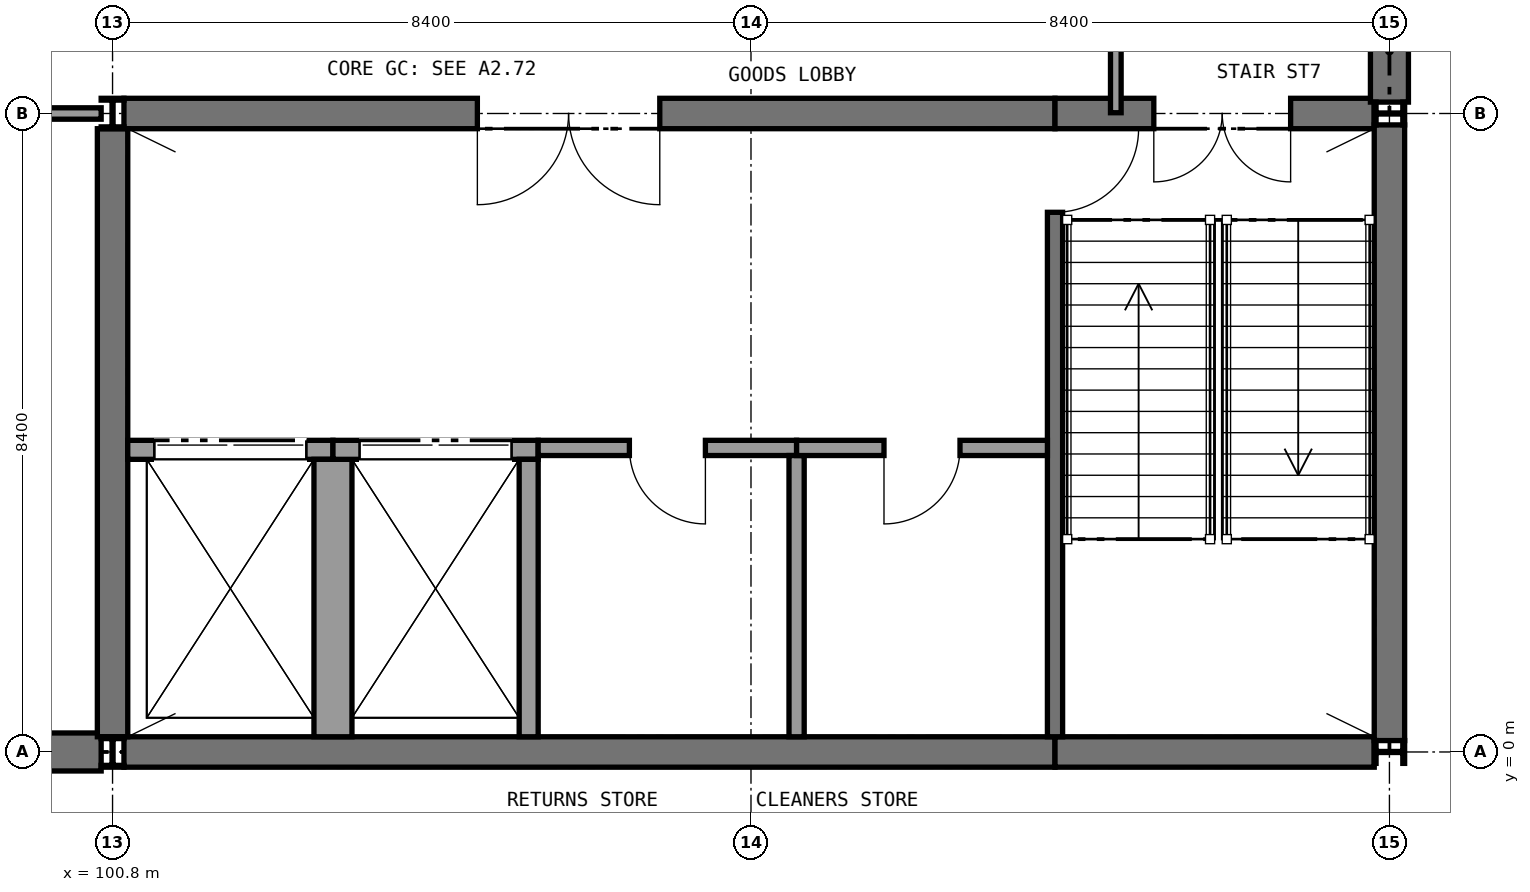
"""IFC4 building model, lengths in metres.
Left out: names, types, materials, properties, quantities, classifications, styles, units other than length and angle.
Written with IfcOpenShell. Run it as: python <this file> out.ifc"""

import sys

from ifc_helpers import new_model, si_unit, direction, frame, frame_2d, origin, origin_2d, place, context, subcontext, project, spatial, rectangle, i_section, extrude, element, fill, save


model = new_model("IFC4")
c1 = context("Model", 3, precision=1e-05, world=origin(), true_north=direction((0.0, 1.0)))
c2 = subcontext(c1, "Body", "Model", "MODEL_VIEW")
j1 = project(units=[si_unit("LENGTHUNIT", "METRE"), si_unit("PLANEANGLEUNIT", "RADIAN")], contexts=[c1])
p1 = place(None, origin())
s1 = spatial("IfcSite", under=j1, at=p1, CompositionType="ELEMENT")
p2 = place(p1, origin())
s2 = spatial("IfcBuilding", under=s1, at=p2, CompositionType="ELEMENT")
p3 = place(p2, frame((0.0, 0.0, 25.8)))
s3 = spatial("IfcBuildingStorey", under=s2, at=p3, CompositionType="ELEMENT", Elevation=25.8)
p4 = place(p3, frame((92.55, 0.0, 0.0), z_axis=(0.0, 0.0, 1.0), x_axis=(1.0, 0.0, 0.0)))
e1 = element("IfcWall", 1, at=p4, inside=s3, PredefinedType="SHEAR", context=c2, shape_type="SweptSolid", body=[
    extrude(rectangle(XDim=8.1, YDim=0.5, at=frame_2d((4.05, 0.0))), origin(), (0.0, 0.0, 1.0), 5.2),
])
p5 = place(p3, frame((100.95, 0.0, 0.0), z_axis=(0.0, 0.0, 1.0), x_axis=(1.0, 0.0, 0.0)))
e2 = element("IfcWall", 2, at=p5, inside=s3, PredefinedType="SHEAR", context=c2, shape_type="SweptSolid", body=[
    extrude(rectangle(XDim=12.25, YDim=0.4, at=frame_2d((6.125, 0.0))), origin(), (0.0, 0.0, 1.0), 5.2),
])
p6 = place(p3, frame((113.2, 0.0, 0.0), z_axis=(0.0, 0.0, 1.0), x_axis=(1.0, 0.0, 0.0)))
e3 = element("IfcWall", 3, at=p6, inside=s3, PredefinedType="SHEAR", context=c2, shape_type="SweptSolid", body=[
    extrude(rectangle(XDim=4.2, YDim=0.4, at=frame_2d((2.1, 0.0))), origin(), (0.0, 0.0, 1.0), 4.51),
])
p7 = place(p3, frame((100.95, 8.4, 0.0), z_axis=(0.0, 0.0, 1.0), x_axis=(1.0, 0.0, 0.0)))
e4 = element("IfcWall", 4, at=p7, inside=s3, PredefinedType="SHEAR", context=c2, shape_type="SweptSolid", body=[
    extrude(rectangle(XDim=12.25, YDim=0.4, at=frame_2d((6.125, 0.0))), origin(), (0.0, 0.0, 1.0), 5.2),
])
p8 = place(p7, frame((4.65, 0.0, 0.0)))
e5 = element("IfcOpeningElement", 5, at=p8, cuts=e4, PredefinedType="OPENING", context=c2, shape_type="SweptSolid", body=[
    extrude(rectangle(XDim=2.4, YDim=2.4, at=frame_2d((1.2, 1.2))), frame((0.0, 0.21, 0.0), z_axis=(0.0, -1.0, 0.0), x_axis=(1.0, 0.0, 0.0)), (0.0, 0.0, 1.0), 0.42),
])
p9 = place(p3, frame((113.2, 8.4, 0.0), z_axis=(0.0, 0.0, 1.0), x_axis=(1.0, 0.0, 0.0)))
e6 = element("IfcWall", 6, at=p9, inside=s3, PredefinedType="SHEAR", context=c2, shape_type="SweptSolid", body=[
    extrude(rectangle(XDim=4.2, YDim=0.4, at=frame_2d((2.1, 0.0))), origin(), (0.0, 0.0, 1.0), 4.51),
])
p10 = place(p9, frame((1.3, 0.0, 0.0)))
e7 = element("IfcOpeningElement", 7, at=p10, cuts=e6, PredefinedType="OPENING", context=c2, shape_type="SweptSolid", body=[
    extrude(rectangle(XDim=1.8, YDim=2.1, at=frame_2d((0.9, 1.05))), frame((0.0, 0.21, 0.0), z_axis=(0.0, -1.0, 0.0), x_axis=(1.0, 0.0, 0.0)), (0.0, 0.0, 1.0), 0.42),
])
p11 = place(p3, frame((100.8, 0.2, 0.0), z_axis=(0.0, 0.0, 1.0), x_axis=(0.0, 1.0, 0.0)))
e8 = element("IfcWall", 8, at=p11, inside=s3, PredefinedType="SHEAR", context=c2, shape_type="SweptSolid", body=[
    extrude(rectangle(XDim=8.0, YDim=0.4, at=frame_2d((4.0, 0.0))), origin(), (0.0, 0.0, 1.0), 5.2),
])
p12 = place(p3, frame((117.6, 0.15, 0.0), z_axis=(0.0, 0.0, 1.0), x_axis=(0.0, 1.0, 0.0)))
e9 = element("IfcWall", 9, at=p12, inside=s3, PredefinedType="SHEAR", context=c2, shape_type="SweptSolid", body=[
    extrude(rectangle(XDim=8.1, YDim=0.4, at=frame_2d((4.05, 0.0))), origin(), (0.0, 0.0, 1.0), 5.2),
])
for number, where, z_axis, x_axis in (
    (10, (100.8, 0.0, 0.0), (0.0, 0.0, 1.0), (1.0, 0.0, 0.0)),
    (11, (100.8, 8.4, 0.0), (0.0, 0.0, 1.0), (1.0, 0.0, 0.0)),
    (12, (117.6, 0.0, 0.0), (0.0, 0.0, 1.0), (0.0, 1.0, 0.0)),
    (13, (117.6, 8.4, 0.0), (0.0, 0.0, 1.0), (0.0, 1.0, 0.0)),
):
    element("IfcColumn", number, at=place(p3, frame(where, z_axis=z_axis, x_axis=x_axis)), inside=s3, PredefinedType="COLUMN", context=c2, shape_type="SweptSolid", body=[
        extrude(i_section(OverallWidth=0.3, OverallDepth=0.4, WebThickness=0.013, FlangeThickness=0.024, FilletRadius=0.027, at=origin_2d()), origin(), (0.0, 0.0, 1.0), 5.4),
    ])
p13 = place(p3, frame((92.55, 8.4, 0.0), z_axis=(0.0, 0.0, 1.0), x_axis=(1.0, 0.0, 0.0)))
e14 = element("IfcWall", 14, at=p13, inside=s3, PredefinedType="SOLIDWALL", context=c2, shape_type="SweptSolid", body=[
    extrude(rectangle(XDim=8.1, YDim=0.15, at=frame_2d((4.05, 0.0))), origin(), (0.0, 0.0, 1.0), 4.89),
])
p14 = place(p13, frame((3.35, 0.0, 0.0)))
e15 = element("IfcOpeningElement", 15, at=p14, cuts=e14, PredefinedType="OPENING", context=c2, shape_type="SweptSolid", body=[
    extrude(rectangle(XDim=1.5, YDim=2.1, at=frame_2d((0.75, 1.05))), frame((0.0, 0.085, 0.0), z_axis=(0.0, -1.0, 0.0), x_axis=(1.0, 0.0, 0.0)), (0.0, 0.0, 1.0), 0.17),
])
p15 = place(p3, frame((114.0, 8.41, 0.0), z_axis=(0.0, 0.0, 1.0), x_axis=(0.0, 1.0, 0.0)))
e16 = element("IfcWall", 16, at=p15, inside=s3, PredefinedType="PARTITIONING", context=c2, shape_type="SweptSolid", body=[
    extrude(rectangle(XDim=7.1, YDim=0.14, at=frame_2d((3.55, 0.0))), origin(), (0.0, 0.0, 1.0), 5.2),
])
p16 = place(p3, frame((117.6, 8.55, 0.0), z_axis=(0.0, 0.0, 1.0), x_axis=(0.0, 1.0, 0.0)))
e17 = element("IfcWall", 17, at=p16, inside=s3, PredefinedType="STANDARD", context=c2, shape_type="SweptSolid", body=[
    extrude(rectangle(XDim=8.1, YDim=0.5, at=frame_2d((4.05, 0.0))), origin(), (0.0, 0.0, 1.0), 5.2),
])
p17 = place(p16, frame((1.35, 0.0, 2.7)))
e18 = element("IfcOpeningElement", 18, at=p17, cuts=e17, PredefinedType="OPENING", context=c2, shape_type="SweptSolid", body=[
    extrude(rectangle(XDim=1.2, YDim=1.2, at=frame_2d((0.6, 0.6))), frame((0.0, 0.26, 0.0), z_axis=(0.0, -1.0, 0.0), x_axis=(1.0, 0.0, 0.0)), (0.0, 0.0, 1.0), 0.52),
])
p18 = place(p16, frame((5.55, 0.0, 2.7)))
e19 = element("IfcOpeningElement", 19, at=p18, cuts=e17, PredefinedType="OPENING", context=c2, shape_type="SweptSolid", body=[
    extrude(rectangle(XDim=1.2, YDim=1.2, at=frame_2d((0.6, 0.6))), frame((0.0, 0.26, 0.0), z_axis=(0.0, -1.0, 0.0), x_axis=(1.0, 0.0, 0.0)), (0.0, 0.0, 1.0), 0.52),
])
p19 = place(p3, frame((113.2, 0.2, 0.0), z_axis=(0.0, 0.0, 1.0), x_axis=(0.0, 1.0, 0.0)))
e20 = element("IfcWall", 20, at=p19, inside=s3, PredefinedType="SHEAR", context=c2, shape_type="SweptSolid", body=[
    extrude(rectangle(XDim=8.0, YDim=0.2, at=frame_2d((4.0, 0.0))), origin(), (0.0, 0.0, 1.0), 5.2),
])
p20 = place(p19, frame((6.9, 0.0, 0.0)))
e21 = element("IfcOpeningElement", 21, at=p20, cuts=e20, PredefinedType="OPENING", context=c2, shape_type="SweptSolid", body=[
    extrude(rectangle(XDim=1.11, YDim=2.1, at=frame_2d((0.555, 1.05))), frame((0.0, 0.11, 0.0), z_axis=(0.0, -1.0, 0.0), x_axis=(1.0, 0.0, 0.0)), (0.0, 0.0, 1.0), 0.22),
])
p21 = place(p3, frame((101.0, 3.975, 0.0), z_axis=(0.0, 0.0, 1.0), x_axis=(1.0, 0.0, 0.0)))
e22 = element("IfcWall", 22, at=p21, inside=s3, PredefinedType="SOLIDWALL", context=c2, shape_type="SweptSolid", body=[
    extrude(rectangle(XDim=2.7, YDim=0.25, at=frame_2d((1.35, 0.0))), origin(), (0.0, 0.0, 1.0), 5.2),
])
p22 = place(p21, frame((0.35, 0.0, 0.0)))
e23 = element("IfcOpeningElement", 23, at=p22, cuts=e22, PredefinedType="OPENING", context=c2, shape_type="SweptSolid", body=[
    extrude(rectangle(XDim=2.0, YDim=2.2, at=frame_2d((1.0, 1.1))), frame((0.0, 0.135, 0.0), z_axis=(0.0, -1.0, 0.0), x_axis=(1.0, 0.0, 0.0)), (0.0, 0.0, 1.0), 0.27),
])
p23 = place(p3, frame((103.7, 0.2, 0.0), z_axis=(0.0, 0.0, 1.0), x_axis=(0.0, 1.0, 0.0)))
e24 = element("IfcWall", 24, at=p23, inside=s3, PredefinedType="SOLIDWALL", context=c2, shape_type="SweptSolid", body=[
    extrude(rectangle(XDim=3.65, YDim=0.5, at=frame_2d((1.825, 0.0))), origin(), (0.0, 0.0, 1.0), 5.2),
])
p24 = place(p3, frame((103.7, 3.975, 0.0), z_axis=(0.0, 0.0, 1.0), x_axis=(1.0, 0.0, 0.0)))
e25 = element("IfcWall", 25, at=p24, inside=s3, PredefinedType="SOLIDWALL", context=c2, shape_type="SweptSolid", body=[
    extrude(rectangle(XDim=2.7, YDim=0.25, at=frame_2d((1.35, 0.0))), origin(), (0.0, 0.0, 1.0), 5.2),
])
p25 = place(p24, frame((0.35, 0.0, 0.0)))
e26 = element("IfcOpeningElement", 26, at=p25, cuts=e25, PredefinedType="OPENING", context=c2, shape_type="SweptSolid", body=[
    extrude(rectangle(XDim=2.0, YDim=2.2, at=frame_2d((1.0, 1.1))), frame((0.0, 0.135, 0.0), z_axis=(0.0, -1.0, 0.0), x_axis=(1.0, 0.0, 0.0)), (0.0, 0.0, 1.0), 0.27),
])
p26 = place(p3, frame((106.275, 0.2, 0.0), z_axis=(0.0, 0.0, 1.0), x_axis=(0.0, 1.0, 0.0)))
e27 = element("IfcWall", 27, at=p26, inside=s3, PredefinedType="SOLIDWALL", context=c2, shape_type="SweptSolid", body=[
    extrude(rectangle(XDim=3.65, YDim=0.25, at=frame_2d((1.825, 0.0))), origin(), (0.0, 0.0, 1.0), 5.2),
])
p27 = place(p3, frame((106.4, 4.0, 0.0), z_axis=(0.0, 0.0, 1.0), x_axis=(1.0, 0.0, 0.0)))
e28 = element("IfcWall", 28, at=p27, inside=s3, PredefinedType="PARTITIONING", context=c2, shape_type="SweptSolid", body=[
    extrude(rectangle(XDim=3.4, YDim=0.2, at=frame_2d((1.7, 0.0))), origin(), (0.0, 0.0, 1.0), 5.2),
])
p28 = place(p27, frame((1.2, 0.0, 0.0)))
e29 = element("IfcOpeningElement", 29, at=p28, cuts=e28, PredefinedType="OPENING", context=c2, shape_type="SweptSolid", body=[
    extrude(rectangle(XDim=1.0, YDim=2.1, at=frame_2d((0.5, 1.05))), frame((0.0, 0.11, 0.0), z_axis=(0.0, -1.0, 0.0), x_axis=(1.0, 0.0, 0.0)), (0.0, 0.0, 1.0), 0.22),
])
p29 = place(p3, frame((109.8, 0.2, 0.0), z_axis=(0.0, 0.0, 1.0), x_axis=(0.0, 1.0, 0.0)))
e30 = element("IfcWall", 30, at=p29, inside=s3, PredefinedType="PARTITIONING", context=c2, shape_type="SweptSolid", body=[
    extrude(rectangle(XDim=3.7, YDim=0.2, at=frame_2d((1.85, 0.0))), origin(), (0.0, 0.0, 1.0), 5.2),
])
p30 = place(p3, frame((109.8, 4.0, 0.0), z_axis=(0.0, 0.0, 1.0), x_axis=(1.0, 0.0, 0.0)))
e31 = element("IfcWall", 31, at=p30, inside=s3, PredefinedType="PARTITIONING", context=c2, shape_type="SweptSolid", body=[
    extrude(rectangle(XDim=3.3, YDim=0.2, at=frame_2d((1.65, 0.0))), origin(), (0.0, 0.0, 1.0), 5.2),
])
p31 = place(p30, frame((1.15, 0.0, 0.0)))
e32 = element("IfcOpeningElement", 32, at=p31, cuts=e31, PredefinedType="OPENING", context=c2, shape_type="SweptSolid", body=[
    extrude(rectangle(XDim=1.0, YDim=2.1, at=frame_2d((0.5, 1.05))), frame((0.0, 0.11, 0.0), z_axis=(0.0, -1.0, 0.0), x_axis=(1.0, 0.0, 0.0)), (0.0, 0.0, 1.0), 0.22),
])
p32 = place(p20, frame((1.1, 0.0, 0.0), z_axis=(0.0, 0.0, 1.0), x_axis=(-1.0, 0.0, 0.0)))
e33 = element("IfcDoor", 33, at=p32, inside=s3, OperationType="SINGLE_SWING_LEFT", PredefinedType="DOOR", context=c2, shape_type="SweptSolid", body=[
    extrude(rectangle(XDim=1.1, YDim=2.1, at=frame_2d((0.55, 1.05))), frame((0.0, 0.025, 0.0), z_axis=(0.0, -1.0, 0.0), x_axis=(1.0, 0.0, 0.0)), (0.0, 0.0, 1.0), 0.05),
])
fill(e21, e33)
p33 = place(p22, origin())
e34 = element("IfcDoor", 34, at=p33, inside=s3, OperationType="DOUBLE_DOOR_SLIDING", PredefinedType="DOOR", context=c2, shape_type="SweptSolid", body=[
    extrude(rectangle(XDim=2.0, YDim=2.2, at=frame_2d((1.0, 1.1))), frame((0.0, 0.025, 0.0), z_axis=(0.0, -1.0, 0.0), x_axis=(1.0, 0.0, 0.0)), (0.0, 0.0, 1.0), 0.05),
])
fill(e23, e34)
p34 = place(p25, origin())
e35 = element("IfcDoor", 35, at=p34, inside=s3, OperationType="DOUBLE_DOOR_SLIDING", PredefinedType="DOOR", context=c2, shape_type="SweptSolid", body=[
    extrude(rectangle(XDim=2.0, YDim=2.2, at=frame_2d((1.0, 1.1))), frame((0.0, 0.025, 0.0), z_axis=(0.0, -1.0, 0.0), x_axis=(1.0, 0.0, 0.0)), (0.0, 0.0, 1.0), 0.05),
])
fill(e26, e35)
p35 = place(p28, frame((1.0, 0.0, 0.0), z_axis=(0.0, 0.0, 1.0), x_axis=(-1.0, 0.0, 0.0)))
e36 = element("IfcDoor", 36, at=p35, inside=s3, OperationType="SINGLE_SWING_LEFT", PredefinedType="DOOR", context=c2, shape_type="SweptSolid", body=[
    extrude(rectangle(XDim=1.0, YDim=2.1, at=frame_2d((0.5, 1.05))), frame((0.0, 0.025, 0.0), z_axis=(0.0, -1.0, 0.0), x_axis=(1.0, 0.0, 0.0)), (0.0, 0.0, 1.0), 0.05),
])
fill(e29, e36)
p36 = place(p31, frame((1.0, 0.0, 0.0), z_axis=(0.0, 0.0, 1.0), x_axis=(-1.0, 0.0, 0.0)))
e37 = element("IfcDoor", 37, at=p36, inside=s3, OperationType="SINGLE_SWING_RIGHT", PredefinedType="DOOR", context=c2, shape_type="SweptSolid", body=[
    extrude(rectangle(XDim=1.0, YDim=2.1, at=frame_2d((0.5, 1.05))), frame((0.0, 0.025, 0.0), z_axis=(0.0, -1.0, 0.0), x_axis=(1.0, 0.0, 0.0)), (0.0, 0.0, 1.0), 0.05),
])
fill(e32, e37)
p37 = place(p10, frame((1.8, 0.0, 0.0), z_axis=(0.0, 0.0, 1.0), x_axis=(-1.0, 0.0, 0.0)))
e38 = element("IfcDoor", 38, at=p37, inside=s3, OperationType="DOUBLE_DOOR_SINGLE_SWING", PredefinedType="DOOR", context=c2, shape_type="SweptSolid", body=[
    extrude(rectangle(XDim=1.8, YDim=2.1, at=frame_2d((0.9, 1.05))), frame((0.0, 0.025, 0.0), z_axis=(0.0, -1.0, 0.0), x_axis=(1.0, 0.0, 0.0)), (0.0, 0.0, 1.0), 0.05),
])
fill(e7, e38)
p38 = place(p8, frame((2.4, 0.0, 0.0), z_axis=(0.0, 0.0, 1.0), x_axis=(-1.0, 0.0, 0.0)))
e39 = element("IfcDoor", 39, at=p38, inside=s3, OperationType="DOUBLE_DOOR_SINGLE_SWING", PredefinedType="DOOR", context=c2, shape_type="SweptSolid", body=[
    extrude(rectangle(XDim=2.4, YDim=2.4, at=frame_2d((1.2, 1.2))), frame((0.0, 0.025, 0.0), z_axis=(0.0, -1.0, 0.0), x_axis=(1.0, 0.0, 0.0)), (0.0, 0.0, 1.0), 0.05),
])
fill(e5, e39)
save(model, sys.argv[1])
